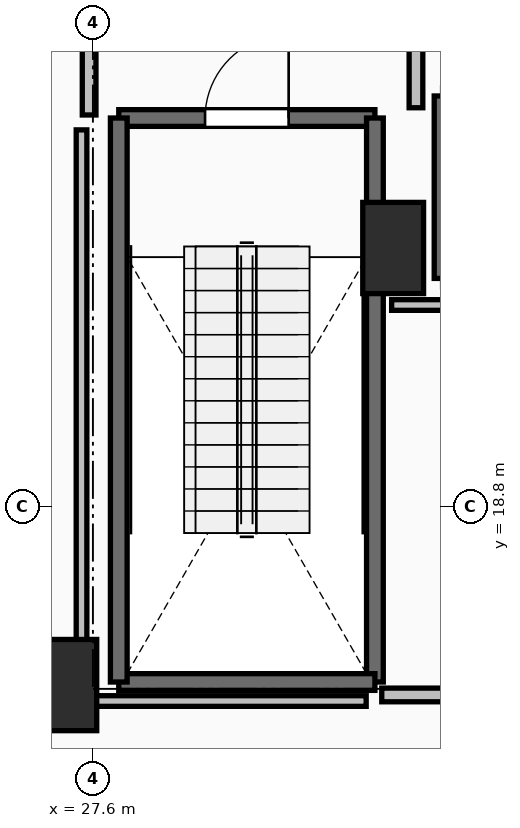
"""IFC4 building model, lengths in metres.
Left out: names, types, materials, properties, quantities, classifications, styles, units other than length and angle.
Written with IfcOpenShell. Run it as: python <this file> out.ifc"""

import sys

from ifc_helpers import new_model, si_unit, direction, frame, frame_2d, origin, origin_2d, place, context, subcontext, project, spatial, rectangle, extrude, element, fill, save


model = new_model("IFC4")
c1 = context("Model", 3, precision=1e-05, world=origin(), true_north=direction((0.0, 1.0)))
c2 = subcontext(c1, "Body", "Model", "MODEL_VIEW")
j1 = project(units=[si_unit("LENGTHUNIT", "METRE"), si_unit("PLANEANGLEUNIT", "RADIAN")], contexts=[c1])
p1 = place(None, origin())
s1 = spatial("IfcSite", under=j1, at=p1, CompositionType="ELEMENT")
p2 = place(p1, origin())
s2 = spatial("IfcBuilding", under=s1, at=p2, CompositionType="ELEMENT")
p3 = place(p2, frame((0.0, 0.0, 19.2)))
s3 = spatial("IfcBuildingStorey", under=s2, at=p3, CompositionType="ELEMENT", Elevation=19.2)
for number, where, z_axis, x_axis in (
    (1, (27.25, 16.45, 0.0), (0.0, 0.0, 1.0), (1.0, 0.0, 0.0)),
    (2, (31.55, 22.2, 0.0), (0.0, 0.0, 1.0), (1.0, 0.0, 0.0)),
):
    element("IfcColumn", number, at=place(p3, frame(where, z_axis=z_axis, x_axis=x_axis)), inside=s3, PredefinedType="PILASTER", context=c2, shape_type="SweptSolid", body=[
        extrude(rectangle(XDim=0.8, YDim=1.2, at=origin_2d()), origin(), (0.0, 0.0, 1.0), 4.8),
    ])
p4 = place(p3, frame((27.94, 23.91, 0.0), z_axis=(0.0, 0.0, 1.0), x_axis=(1.0, 0.0, 0.0)))
e3 = element("IfcWall", 3, at=p4, inside=s3, PredefinedType="SOLIDWALL", context=c2, shape_type="SweptSolid", body=[
    extrude(rectangle(XDim=3.37, YDim=0.22, at=frame_2d((1.685, 0.0))), origin(), (0.0, 0.0, 1.0), 4.54),
])
p5 = place(p4, frame((1.135, 0.0, 0.0)))
e4 = element("IfcOpeningElement", 4, at=p5, cuts=e3, PredefinedType="OPENING", context=c2, shape_type="SweptSolid", body=[
    extrude(rectangle(XDim=1.1, YDim=2.15, at=frame_2d((0.55, 1.075))), frame((0.0, 0.125, 0.0), z_axis=(0.0, -1.0, 0.0), x_axis=(1.0, 0.0, 0.0)), (0.0, 0.0, 1.0), 0.25),
])
p6 = place(p3, frame((31.31, 23.91, 0.0), z_axis=(0.0, 0.0, 1.0), x_axis=(0.0, -1.0, 0.0)))
e5 = element("IfcWall", 5, at=p6, inside=s3, PredefinedType="SOLIDWALL", context=c2, shape_type="SweptSolid", body=[
    extrude(rectangle(XDim=7.42, YDim=0.22, at=frame_2d((3.71, 0.0))), origin(), (0.0, 0.0, 1.0), 4.54),
])
p7 = place(p3, frame((31.31, 16.49, 0.0), z_axis=(0.0, 0.0, 1.0), x_axis=(-1.0, 0.0, 0.0)))
e6 = element("IfcWall", 6, at=p7, inside=s3, PredefinedType="SOLIDWALL", context=c2, shape_type="SweptSolid", body=[
    extrude(rectangle(XDim=3.37, YDim=0.22, at=frame_2d((1.685, 0.0))), origin(), (0.0, 0.0, 1.0), 4.54),
])
p8 = place(p3, frame((27.94, 16.49, 0.0), z_axis=(0.0, 0.0, 1.0), x_axis=(0.0, 1.0, 0.0)))
e7 = element("IfcWall", 7, at=p8, inside=s3, PredefinedType="SOLIDWALL", context=c2, shape_type="SweptSolid", body=[
    extrude(rectangle(XDim=7.42, YDim=0.22, at=frame_2d((3.71, 0.0))), origin(), (0.0, 0.0, 1.0), 4.54),
])
p9 = place(p3, frame((32.2, 24.2, 0.0), z_axis=(0.0, 0.0, 1.0), x_axis=(0.0, -1.0, 0.0)))
e8 = element("IfcWall", 8, at=p9, inside=s3, PredefinedType="SOLIDWALL", context=c2, shape_type="SweptSolid", body=[
    extrude(rectangle(XDim=2.4, YDim=0.22, at=frame_2d((1.2, 0.0))), origin(), (0.0, 0.0, 1.0), 4.54),
])
p10 = place(p3, frame((31.85, 24.045, 0.0), z_axis=(0.0, 0.0, 1.0), x_axis=(0.0, 1.0, 0.0)))
e9 = element("IfcWall", 9, at=p10, inside=s3, PredefinedType="PARTITIONING", context=c2, shape_type="SweptSolid", body=[
    extrude(rectangle(XDim=3.91, YDim=0.18, at=frame_2d((1.955, 0.0))), origin(), (0.0, 0.0, 1.0), 4.54),
])
p11 = place(p10, frame((1.355, 0.0, 0.0)))
e10 = element("IfcOpeningElement", 10, at=p11, cuts=e9, PredefinedType="OPENING", context=c2, shape_type="SweptSolid", body=[
    extrude(rectangle(XDim=1.2, YDim=2.15, at=frame_2d((0.6, 1.075))), frame((0.0, 0.105, 0.0), z_axis=(0.0, -1.0, 0.0), x_axis=(1.0, 0.0, 0.0)), (0.0, 0.0, 1.0), 0.21),
])
p12 = place(p3, frame((27.55, 28.0, 0.0), z_axis=(0.0, 0.0, 1.0), x_axis=(0.0, -1.0, 0.0)))
e11 = element("IfcWall", 11, at=p12, inside=s3, PredefinedType="PARTITIONING", context=c2, shape_type="SweptSolid", body=[
    extrude(rectangle(XDim=4.05, YDim=0.18, at=frame_2d((2.025, 0.0))), origin(), (0.0, 0.0, 1.0), 4.54),
])
p13 = place(p12, frame((1.425, 0.0, 0.0)))
e12 = element("IfcOpeningElement", 12, at=p13, cuts=e11, PredefinedType="OPENING", context=c2, shape_type="SweptSolid", body=[
    extrude(rectangle(XDim=1.2, YDim=2.15, at=frame_2d((0.6, 1.075))), frame((0.0, 0.105, 0.0), z_axis=(0.0, -1.0, 0.0), x_axis=(1.0, 0.0, 0.0)), (0.0, 0.0, 1.0), 0.21),
])
p14 = place(p3, frame((31.4, 16.32, 0.0), z_axis=(0.0, 0.0, 1.0), x_axis=(1.0, 0.0, 0.0)))
e13 = element("IfcWall", 13, at=p14, inside=s3, PredefinedType="PARTITIONING", context=c2, shape_type="SweptSolid", body=[
    extrude(rectangle(XDim=4.4, YDim=0.18, at=frame_2d((2.2, 0.0))), origin(), (0.0, 0.0, 1.0), 4.54),
])
p15 = place(p14, frame((1.775, 0.0, 0.0)))
e14 = element("IfcOpeningElement", 14, at=p15, cuts=e13, PredefinedType="OPENING", context=c2, shape_type="SweptSolid", body=[
    extrude(rectangle(XDim=0.85, YDim=2.1, at=frame_2d((0.425, 1.05))), frame((0.0, 0.105, 0.0), z_axis=(0.0, -1.0, 0.0), x_axis=(1.0, 0.0, 0.0)), (0.0, 0.0, 1.0), 0.21),
])
p16 = place(p3, frame((35.58, 21.45, 0.0), z_axis=(0.0, 0.0, 1.0), x_axis=(-1.0, 0.0, 0.0)))
e15 = element("IfcWall", 15, at=p16, inside=s3, PredefinedType="PARTITIONING", context=c2, shape_type="SweptSolid", body=[
    extrude(rectangle(XDim=4.05, YDim=0.14, at=frame_2d((2.025, 0.0))), origin(), (0.0, 0.0, 1.0), 4.54),
])
p17 = place(p3, frame((31.195, 16.24, 0.0), z_axis=(0.0, 0.0, 1.0), x_axis=(-1.0, 0.0, 0.0)))
e16 = element("IfcWall", 16, at=p17, inside=s3, PredefinedType="PARTITIONING", context=c2, shape_type="SweptSolid", body=[
    extrude(rectangle(XDim=3.745, YDim=0.14, at=frame_2d((1.873, 0.0))), origin(), (0.0, 0.0, 1.0), 3.732),
])
p18 = place(p3, frame((27.45, 16.24, 0.0), z_axis=(0.0, 0.0, 1.0), x_axis=(0.0, 1.0, 0.0)))
e17 = element("IfcWall", 17, at=p18, inside=s3, PredefinedType="PARTITIONING", context=c2, shape_type="SweptSolid", body=[
    extrude(rectangle(XDim=7.514, YDim=0.14, at=frame_2d((3.757, 0.0))), origin(), (0.0, 0.0, 1.0), 3.732),
])
p19 = place(p5, origin())
e18 = element("IfcDoor", 18, at=p19, inside=s3, OperationType="SINGLE_SWING_RIGHT", PredefinedType="DOOR", context=c2, shape_type="SweptSolid", body=[
    extrude(rectangle(XDim=1.1, YDim=2.15, at=frame_2d((0.55, 1.075))), frame((0.0, 0.025, 0.0), z_axis=(0.0, -1.0, 0.0), x_axis=(1.0, 0.0, 0.0)), (0.0, 0.0, 1.0), 0.05),
])
fill(e4, e18)
save(model, sys.argv[1])
